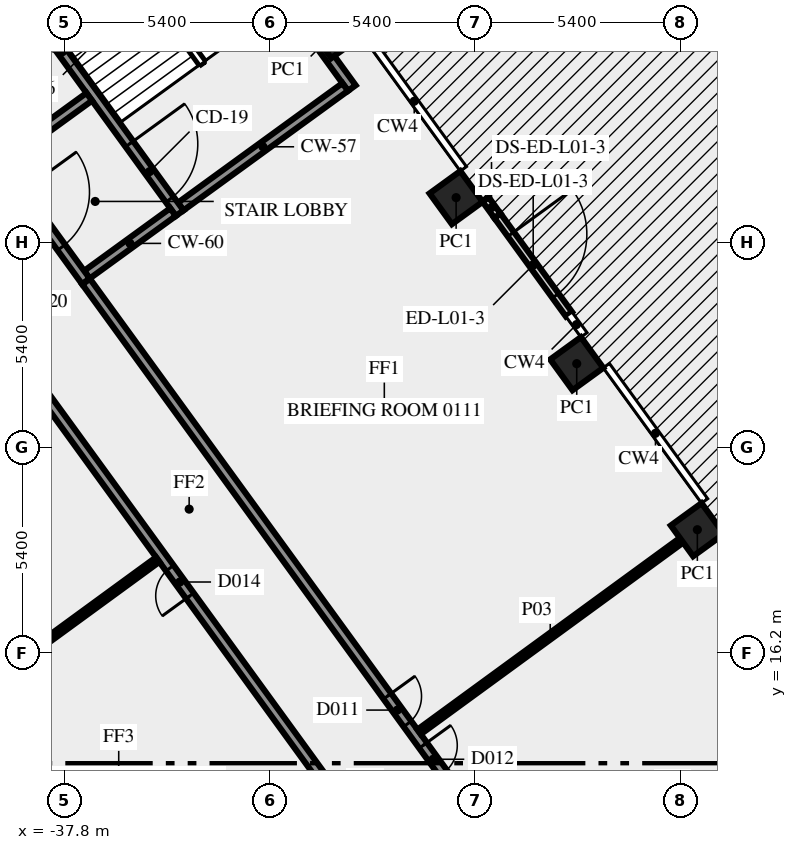
"""IFC4 building model, lengths in metres.
Left out: names, types, materials, properties, quantities, classifications, styles, units other than length and angle.
Written with IfcOpenShell. Run it as: python <this file> out.ifc"""

import sys

from ifc_helpers import new_model, si_unit, direction, frame, frame_2d, origin, origin_2d, place, context, subcontext, project, spatial, rectangle, extrude, element, fill, save


model = new_model("IFC4")
c1 = context("Model", 3, precision=1e-05, world=origin(), true_north=direction((0.0, 1.0)))
c2 = subcontext(c1, "Body", "Model", "MODEL_VIEW")
j1 = project(units=[si_unit("LENGTHUNIT", "METRE"), si_unit("PLANEANGLEUNIT", "RADIAN")], contexts=[c1])
p1 = place(None, origin())
s1 = spatial("IfcSite", under=j1, at=p1, CompositionType="ELEMENT")
p2 = place(p1, origin())
s2 = spatial("IfcBuilding", under=s1, at=p2, CompositionType="ELEMENT")
p3 = place(p2, frame((0.0, 0.0, 6.0)))
s3 = spatial("IfcBuildingStorey", under=s2, at=p3, CompositionType="ELEMENT", Elevation=6.0)
for number, where, z_axis, x_axis in (
    (1, (-21.147, 19.444, 0.0), (0.0, 0.0, 1.0), (-0.588, 0.809, 0.0)),
    (2, (-24.321, 23.812, 0.0), (0.0, 0.0, 1.0), (-0.588, 0.809, 0.0)),
    (3, (-27.495, 28.181, 0.0), (0.0, 0.0, 1.0), (-0.588, 0.809, 0.0)),
    (4, (-30.669, 32.55, 0.0), (0.0, 0.0, 1.0), (-0.588, 0.809, 0.0)),
):
    element("IfcColumn", number, at=place(p3, frame(where, z_axis=z_axis, x_axis=x_axis)), inside=s3, PredefinedType="COLUMN", context=c2, shape_type="SweptSolid", body=[
        extrude(rectangle(XDim=1.0, YDim=1.0, at=origin_2d()), origin(), (0.0, 0.0, 1.0), 5.1),
    ])
p4 = place(p3, frame((-26.409, 27.705, 0.0), z_axis=(0.0, 0.0, 1.0), x_axis=(0.587800113352, -0.809006196974, 0.0)))
e5 = element("IfcWall", 5, at=p4, inside=s3, PredefinedType="SOLIDWALL", context=c2, shape_type="SweptSolid", body=[
    extrude(rectangle(XDim=3.204, YDim=0.2, at=frame_2d((1.602, 0.0))), origin(), (0.0, 0.0, 1.0), 5.1),
])
p5 = place(p4, frame((0.602, 0.0, 0.0)))
e6 = element("IfcOpeningElement", 6, at=p5, cuts=e5, PredefinedType="OPENING", context=c2, shape_type="SweptSolid", body=[
    extrude(rectangle(XDim=2.0, YDim=2.4, at=frame_2d((1.0, 1.2))), frame((0.0, 0.11, 0.0), z_axis=(0.0, -1.0, 0.0), x_axis=(1.0, 0.0, 0.0)), (0.0, 0.0, 1.0), 0.22),
])
p6 = place(p3, frame((-30.24, 31.064, 0.0), z_axis=(0.0, 0.0, 1.0), x_axis=(-0.587795589702, 0.809009483706, 0.0)))
e7 = element("IfcWall", 7, at=p6, inside=s3, PredefinedType="SHEAR", context=c2, shape_type="SweptSolid", body=[
    extrude(rectangle(XDim=10.5, YDim=0.25, at=frame_2d((5.25, 0.0))), origin(), (0.0, 0.0, 1.0), 5.1),
])
p7 = place(p6, frame((2.15, 0.0, 1.0)))
e8 = element("IfcOpeningElement", 8, at=p7, cuts=e7, PredefinedType="OPENING", context=c2, shape_type="SweptSolid", body=[
    extrude(rectangle(XDim=1.2, YDim=1.2, at=frame_2d((0.6, 0.6))), frame((0.0, 0.135, 0.0), z_axis=(0.0, -1.0, 0.0), x_axis=(1.0, 0.0, 0.0)), (0.0, 0.0, 1.0), 0.27),
])
p8 = place(p3, frame((-30.414, 31.092, 0.0), z_axis=(0.0, 0.0, 1.0), x_axis=(-0.8089984606, -0.587810760999, 0.0)))
e9 = element("IfcWall", 9, at=p8, inside=s3, PredefinedType="SHEAR", context=c2, shape_type="SweptSolid", body=[
    extrude(rectangle(XDim=5.35, YDim=0.25, at=frame_2d((2.675, 0.0))), origin(), (0.0, 0.0, 1.0), 5.1),
])
p9 = place(p3, frame((-40.942, 36.267, 0.0), z_axis=(0.0, 0.0, 1.0), x_axis=(0.587795589702, -0.809009483706, 0.0)))
e10 = element("IfcWall", 10, at=p9, inside=s3, PredefinedType="SHEAR", context=c2, shape_type="SweptSolid", body=[
    extrude(rectangle(XDim=10.5, YDim=0.25, at=frame_2d((5.25, 0.0))), origin(), (0.0, 0.0, 1.0), 5.1),
])
p10 = place(p9, frame((8.25, 0.0, 0.0)))
e11 = element("IfcOpeningElement", 11, at=p10, cuts=e10, PredefinedType="OPENING", context=c2, shape_type="SweptSolid", body=[
    extrude(rectangle(XDim=1.8, YDim=2.1, at=frame_2d((0.9, 1.05))), frame((0.0, 0.135, 0.0), z_axis=(0.0, -1.0, 0.0), x_axis=(1.0, 0.0, 0.0)), (0.0, 0.0, 1.0), 0.27),
])
for number, where, z_axis, x_axis in (
    (12, (-34.945, 27.8, 0.0), (0.0, 0.0, 1.0), (-0.809, -0.588, 0.0)),
    (13, (-37.149, 30.834, 0.0), (0.0, 0.0, 1.0), (-0.809, -0.588, 0.0)),
):
    element("IfcWall", number, at=place(p3, frame(where, z_axis=z_axis, x_axis=x_axis)), inside=s3, PredefinedType="SHEAR", context=c2, shape_type="SweptSolid", body=[
        extrude(rectangle(XDim=2.8, YDim=0.25, at=frame_2d((1.4, 0.0))), origin(), (0.0, 0.0, 1.0), 5.1),
    ])
p11 = place(p3, frame((-39.589, 29.216, 0.0), z_axis=(0.0, 0.0, 1.0), x_axis=(0.587772420479, -0.809026317077, 0.0)))
e14 = element("IfcWall", 14, at=p11, inside=s3, PredefinedType="SHEAR", context=c2, shape_type="SweptSolid", body=[
    extrude(rectangle(XDim=4.0, YDim=0.25, at=frame_2d((2.0, 0.0))), origin(), (0.0, 0.0, 1.0), 5.1),
])
p12 = place(p11, frame((1.1, 0.0, 0.0)))
e15 = element("IfcOpeningElement", 15, at=p12, cuts=e14, PredefinedType="OPENING", context=c2, shape_type="SweptSolid", body=[
    extrude(rectangle(XDim=1.8, YDim=2.1, at=frame_2d((0.9, 1.05))), frame((0.0, 0.135, 0.0), z_axis=(0.0, -1.0, 0.0), x_axis=(1.0, 0.0, 0.0)), (0.0, 0.0, 1.0), 0.27),
])
p13 = place(p3, frame((-20.531, -1.523, 0.0), z_axis=(0.0, 0.0, 1.0), x_axis=(-0.587784522481, 0.809017524614, 0.0)))
e16 = element("IfcWall", 16, at=p13, inside=s3, PredefinedType="SOLIDWALL", context=c2, shape_type="SweptSolid", body=[
    extrude(rectangle(XDim=49.912, YDim=0.25, at=frame_2d((24.956, 0.0))), origin(), (0.0, 0.0, 1.0), 5.1),
])
p14 = place(p13, frame((48.57, 0.0, 0.0)))
e17 = element("IfcOpeningElement", 17, at=p14, cuts=e16, PredefinedType="OPENING", context=c2, shape_type="SweptSolid", body=[
    extrude(rectangle(XDim=0.9, YDim=2.1, at=frame_2d((0.45, 1.05))), frame((0.0, 0.135, 0.0), z_axis=(0.0, -1.0, 0.0), x_axis=(1.0, 0.0, 0.0)), (0.0, 0.0, 1.0), 0.27),
])
p15 = place(p13, frame((10.516, 0.0, 0.0)))
e18 = element("IfcOpeningElement", 18, at=p15, cuts=e16, PredefinedType="OPENING", context=c2, shape_type="SweptSolid", body=[
    extrude(rectangle(XDim=0.9, YDim=2.1, at=frame_2d((0.45, 1.05))), frame((0.0, 0.135, 0.0), z_axis=(0.0, -1.0, 0.0), x_axis=(1.0, 0.0, 0.0)), (0.0, 0.0, 1.0), 0.27),
])
p16 = place(p13, frame((23.766, 0.0, 0.0)))
e19 = element("IfcOpeningElement", 19, at=p16, cuts=e16, PredefinedType="OPENING", context=c2, shape_type="SweptSolid", body=[
    extrude(rectangle(XDim=0.9, YDim=2.1, at=frame_2d((0.45, 1.05))), frame((0.0, 0.135, 0.0), z_axis=(0.0, -1.0, 0.0), x_axis=(1.0, 0.0, 0.0)), (0.0, 0.0, 1.0), 0.27),
])
p17 = place(p13, frame((8.916, 0.0, 0.0)))
e20 = element("IfcOpeningElement", 20, at=p17, cuts=e16, PredefinedType="OPENING", context=c2, shape_type="SweptSolid", body=[
    extrude(rectangle(XDim=0.9, YDim=2.1, at=frame_2d((0.45, 1.05))), frame((0.0, 0.135, 0.0), z_axis=(0.0, -1.0, 0.0), x_axis=(1.0, 0.0, 0.0)), (0.0, 0.0, 1.0), 0.27),
])
p18 = place(p3, frame((-37.232, 25.972, 0.0), z_axis=(0.0, 0.0, 1.0), x_axis=(0.587786323093, -0.809016216391, 0.0)))
e21 = element("IfcWall", 21, at=p18, inside=s3, PredefinedType="SOLIDWALL", context=c2, shape_type="SweptSolid", body=[
    extrude(rectangle(XDim=33.493, YDim=0.25, at=frame_2d((16.747, 0.0))), origin(), (0.0, 0.0, 1.0), 5.1),
])
p19 = place(p18, frame((13.485, 0.0, 0.0)))
e22 = element("IfcOpeningElement", 22, at=p19, cuts=e21, PredefinedType="OPENING", context=c2, shape_type="SweptSolid", body=[
    extrude(rectangle(XDim=0.9, YDim=2.1, at=frame_2d((0.45, 1.05))), frame((0.0, 0.135, 0.0), z_axis=(0.0, -1.0, 0.0), x_axis=(1.0, 0.0, 0.0)), (0.0, 0.0, 1.0), 0.27),
])
p20 = place(p18, frame((15.085, 0.0, 0.0)))
e23 = element("IfcOpeningElement", 23, at=p20, cuts=e21, PredefinedType="OPENING", context=c2, shape_type="SweptSolid", body=[
    extrude(rectangle(XDim=0.9, YDim=2.1, at=frame_2d((0.45, 1.05))), frame((0.0, 0.135, 0.0), z_axis=(0.0, -1.0, 0.0), x_axis=(1.0, 0.0, 0.0)), (0.0, 0.0, 1.0), 0.27),
])
p21 = place(p3, frame((-28.469, 14.124, 0.0), z_axis=(0.0, 0.0, 1.0), x_axis=(0.80760412282, 0.589725004391, 0.0)))
e24 = element("IfcWall", 24, at=p21, inside=s3, PredefinedType="PARTITIONING", context=c2, shape_type="SweptSolid", body=[
    extrude(rectangle(XDim=8.545, YDim=0.15, at=frame_2d((4.272, 0.0))), origin(), (0.0, 0.0, 1.0), 5.1),
])
p22 = place(p3, frame((-43.142, 12.966, 0.0), z_axis=(0.0, 0.0, 1.0), x_axis=(0.807596868297, 0.589734939034, 0.0)))
e25 = element("IfcWall", 25, at=p22, inside=s3, PredefinedType="PARTITIONING", context=c2, shape_type="SweptSolid", body=[
    extrude(rectangle(XDim=9.651, YDim=0.15, at=frame_2d((4.825, 0.0))), origin(), (0.0, 0.0, 1.0), 4.1),
])
p23 = place(p3, frame((-26.409, 27.705, 0.0), z_axis=(0.0, 0.0, 1.0), x_axis=(-0.587649242333, 0.809115793929, 0.0)))
e26 = element("IfcWall", 26, at=p23, inside=s3, PredefinedType="SOLIDWALL", context=c2, shape_type="SweptSolid", body=[
    extrude(rectangle(XDim=0.528, YDim=0.2, at=frame_2d((0.264, 0.0))), origin(), (0.0, 0.0, 1.0), 5.1),
])
p24 = place(p5, origin())
e27 = element("IfcDoor", 27, at=p24, inside=s3, OperationType="DOUBLE_DOOR_SINGLE_SWING", PredefinedType="DOOR", context=c2, shape_type="SweptSolid", body=[
    extrude(rectangle(XDim=2.0, YDim=2.4, at=frame_2d((1.0, 1.2))), frame((0.0, 0.025, 0.0), z_axis=(0.0, -1.0, 0.0), x_axis=(1.0, 0.0, 0.0)), (0.0, 0.0, 1.0), 0.05),
])
fill(e6, e27)
p25 = place(p10, origin())
e28 = element("IfcDoor", 28, at=p25, inside=s3, OperationType="DOUBLE_DOOR_SINGLE_SWING", PredefinedType="DOOR", context=c2, shape_type="SweptSolid", body=[
    extrude(rectangle(XDim=1.8, YDim=2.1, at=frame_2d((0.9, 1.05))), frame((0.0, 0.025, 0.0), z_axis=(0.0, -1.0, 0.0), x_axis=(1.0, 0.0, 0.0)), (0.0, 0.0, 1.0), 0.05),
])
fill(e11, e28)
p26 = place(p12, origin())
e29 = element("IfcDoor", 29, at=p26, inside=s3, OperationType="DOUBLE_DOOR_SINGLE_SWING", PredefinedType="DOOR", context=c2, shape_type="SweptSolid", body=[
    extrude(rectangle(XDim=1.8, YDim=2.1, at=frame_2d((0.9, 1.05))), frame((0.0, 0.025, 0.0), z_axis=(0.0, -1.0, 0.0), x_axis=(1.0, 0.0, 0.0)), (0.0, 0.0, 1.0), 0.05),
])
fill(e15, e29)
p27 = place(p19, origin())
e30 = element("IfcDoor", 30, at=p27, inside=s3, OperationType="SINGLE_SWING_RIGHT", PredefinedType="DOOR", context=c2, shape_type="SweptSolid", body=[
    extrude(rectangle(XDim=0.9, YDim=2.1, at=frame_2d((0.45, 1.05))), frame((0.0, 0.025, 0.0), z_axis=(0.0, -1.0, 0.0), x_axis=(1.0, 0.0, 0.0)), (0.0, 0.0, 1.0), 0.05),
])
fill(e22, e30)
p28 = place(p16, origin())
e31 = element("IfcDoor", 31, at=p28, inside=s3, OperationType="SINGLE_SWING_RIGHT", PredefinedType="DOOR", context=c2, shape_type="SweptSolid", body=[
    extrude(rectangle(XDim=0.9, YDim=2.1, at=frame_2d((0.45, 1.05))), frame((0.0, 0.025, 0.0), z_axis=(0.0, -1.0, 0.0), x_axis=(1.0, 0.0, 0.0)), (0.0, 0.0, 1.0), 0.05),
])
fill(e19, e31)
p29 = place(p20, origin())
e32 = element("IfcDoor", 32, at=p29, inside=s3, OperationType="SINGLE_SWING_LEFT", PredefinedType="DOOR", context=c2, shape_type="SweptSolid", body=[
    extrude(rectangle(XDim=0.9, YDim=2.1, at=frame_2d((0.45, 1.05))), frame((0.0, 0.025, 0.0), z_axis=(0.0, -1.0, 0.0), x_axis=(1.0, 0.0, 0.0)), (0.0, 0.0, 1.0), 0.05),
])
fill(e23, e32)
save(model, sys.argv[1])
